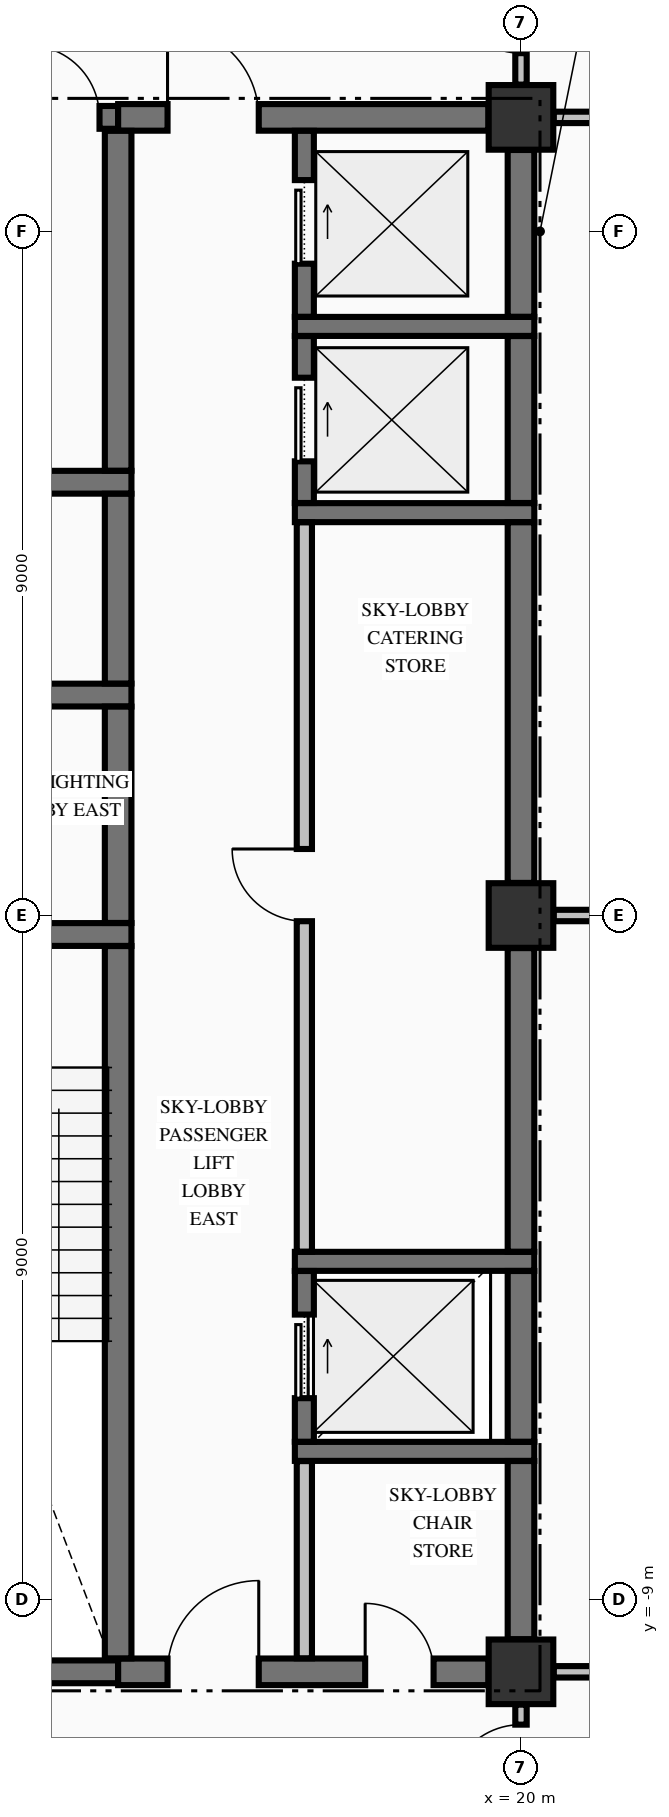
"""IFC4 building model, lengths in metres.
Left out: names, types, materials, properties, quantities, classifications, styles, units other than length and angle.
Written with IfcOpenShell. Run it as: python <this file> out.ifc"""

import sys

from ifc_helpers import new_model, si_unit, direction, frame, frame_2d, origin, origin_2d, place, context, subcontext, project, spatial, rectangle, extrude, element, fill, save


model = new_model("IFC4")
c1 = context("Model", 3, precision=1e-05, world=origin(), true_north=direction((0.0, 1.0)))
c2 = subcontext(c1, "Body", "Model", "MODEL_VIEW")
j1 = project(units=[si_unit("LENGTHUNIT", "METRE"), si_unit("PLANEANGLEUNIT", "RADIAN")], contexts=[c1])
p1 = place(None, origin())
s1 = spatial("IfcSite", under=j1, at=p1, CompositionType="ELEMENT")
p2 = place(p1, origin())
s2 = spatial("IfcBuilding", under=s1, at=p2, CompositionType="ELEMENT")
p3 = place(p2, frame((0.0, 0.0, 158.24)))
s3 = spatial("IfcBuildingStorey", under=s2, at=p3, CompositionType="ELEMENT", Elevation=158.24)
for number, where, z_axis, x_axis in (
    (1, (20.0, -9.95, -0.425), (0.0, 0.0, 1.0), (1.0, 0.0, 0.0)),
    (2, (20.0, 10.5, -0.425), (0.0, 0.0, 1.0), (1.0, 0.0, 0.0)),
    (3, (20.0, 0.0, -0.425), (0.0, 0.0, 1.0), (1.0, 0.0, 0.0)),
):
    element("IfcColumn", number, at=place(p3, frame(where, z_axis=z_axis, x_axis=x_axis)), inside=s3, PredefinedType="COLUMN", context=c2, shape_type="SweptSolid", body=[
        extrude(rectangle(XDim=0.85, YDim=0.85, at=origin_2d()), origin(), (0.0, 0.0, 1.0), 4.595),
    ])
p4 = place(p3, frame((11.429, -9.95, 0.0), z_axis=(0.0, 0.0, 1.0), x_axis=(1.0, 0.0, 0.0)))
e4 = element("IfcWall", 4, at=p4, inside=s3, PredefinedType="SHEAR", context=c2, shape_type="SweptSolid", body=[
    extrude(rectangle(XDim=3.271, YDim=0.3, at=frame_2d((1.635, 0.0))), origin(), (0.0, 0.0, 1.0), 4.17),
])
p5 = place(p3, frame((14.7, -9.95, 0.0), z_axis=(0.0, 0.0, 1.0), x_axis=(1.0, 0.0, 0.0)))
e5 = element("IfcWall", 5, at=p5, inside=s3, PredefinedType="SHEAR", context=c2, shape_type="SweptSolid", body=[
    extrude(rectangle(XDim=4.871, YDim=0.35, at=frame_2d((2.436, 0.0))), origin(), (0.0, 0.0, 1.0), 4.17),
])
p6 = place(p5, frame((0.65, 0.0, 0.0)))
e6 = element("IfcOpeningElement", 6, at=p6, cuts=e5, PredefinedType="OPENING", context=c2, shape_type="SweptSolid", body=[
    extrude(rectangle(XDim=1.2, YDim=2.15, at=frame_2d((0.6, 1.075))), frame((0.0, 0.185, 0.0), z_axis=(0.0, -1.0, 0.0), x_axis=(1.0, 0.0, 0.0)), (0.0, 0.0, 1.0), 0.37),
])
p7 = place(p5, frame((3.25, 0.0, 0.0)))
e7 = element("IfcOpeningElement", 7, at=p7, cuts=e5, PredefinedType="OPENING", context=c2, shape_type="SweptSolid", body=[
    extrude(rectangle(XDim=0.9, YDim=2.15, at=frame_2d((0.45, 1.075))), frame((0.0, 0.185, 0.0), z_axis=(0.0, -1.0, 0.0), x_axis=(1.0, 0.0, 0.0)), (0.0, 0.0, 1.0), 0.37),
])
for number, where, z_axis, x_axis in (
    (8, (17.025, -7.05, 0.0), (0.0, 0.0, 1.0), (1.0, 0.0, 0.0)),
    (9, (17.025, -4.55, 0.0), (0.0, 0.0, 1.0), (1.0, 0.0, 0.0)),
):
    element("IfcWall", number, at=place(p3, frame(where, z_axis=z_axis, x_axis=x_axis)), inside=s3, PredefinedType="SOLIDWALL", context=c2, shape_type="SweptSolid", body=[
        extrude(rectangle(XDim=3.15, YDim=0.25, at=frame_2d((1.575, 0.0))), origin(), (0.0, 0.0, 1.0), 4.17),
    ])
p8 = place(p3, frame((11.429, -0.25, 0.0), z_axis=(0.0, 0.0, 1.0), x_axis=(1.0, 0.0, 0.0)))
e10 = element("IfcWall", 10, at=p8, inside=s3, PredefinedType="SHEAR", context=c2, shape_type="SweptSolid", body=[
    extrude(rectangle(XDim=3.446, YDim=0.3, at=frame_2d((1.723, 0.0))), origin(), (0.0, 0.0, 1.0), 4.17),
])
p9 = place(p8, frame((1.171, 0.0, 0.0)))
e11 = element("IfcOpeningElement", 11, at=p9, cuts=e10, PredefinedType="OPENING", context=c2, shape_type="SweptSolid", body=[
    extrude(rectangle(XDim=1.1, YDim=2.15, at=frame_2d((0.55, 1.075))), frame((0.0, 0.16, 0.0), z_axis=(0.0, -1.0, 0.0), x_axis=(1.0, 0.0, 0.0)), (0.0, 0.0, 1.0), 0.32),
])
p10 = place(p3, frame((10.85, 2.9, 0.0), z_axis=(0.0, 0.0, 1.0), x_axis=(1.0, 0.0, 0.0)))
e12 = element("IfcWall", 12, at=p10, inside=s3, PredefinedType="SHEAR", context=c2, shape_type="SweptSolid", body=[
    extrude(rectangle(XDim=4.025, YDim=0.3, at=frame_2d((2.012, 0.0))), origin(), (0.0, 0.0, 1.0), 4.17),
])
p11 = place(p10, frame((0.85, 0.0, 0.0)))
e13 = element("IfcOpeningElement", 13, at=p11, cuts=e12, PredefinedType="OPENING", context=c2, shape_type="SweptSolid", body=[
    extrude(rectangle(XDim=1.1, YDim=2.2, at=frame_2d((0.55, 1.1))), frame((0.0, 0.16, 0.0), z_axis=(0.0, -1.0, 0.0), x_axis=(1.0, 0.0, 0.0)), (0.0, 0.0, 1.0), 0.32),
])
p12 = place(p3, frame((17.025, 5.3, 0.0), z_axis=(0.0, 0.0, 1.0), x_axis=(1.0, 0.0, 0.0)))
e14 = element("IfcWall", 14, at=p12, inside=s3, PredefinedType="SOLIDWALL", context=c2, shape_type="SweptSolid", body=[
    extrude(rectangle(XDim=3.15, YDim=0.25, at=frame_2d((1.575, 0.0))), origin(), (0.0, 0.0, 1.0), 4.17),
])
p13 = place(p3, frame((10.85, 5.7, 0.0), z_axis=(0.0, 0.0, 1.0), x_axis=(1.0, 0.0, 0.0)))
e15 = element("IfcWall", 15, at=p13, inside=s3, PredefinedType="SHEAR", context=c2, shape_type="SweptSolid", body=[
    extrude(rectangle(XDim=4.025, YDim=0.3, at=frame_2d((2.012, 0.0))), origin(), (0.0, 0.0, 1.0), 4.17),
])
p14 = place(p3, frame((17.025, 7.75, 0.0), z_axis=(0.0, 0.0, 1.0), x_axis=(1.0, 0.0, 0.0)))
e16 = element("IfcWall", 16, at=p14, inside=s3, PredefinedType="SOLIDWALL", context=c2, shape_type="SweptSolid", body=[
    extrude(rectangle(XDim=3.15, YDim=0.25, at=frame_2d((1.575, 0.0))), origin(), (0.0, 0.0, 1.0), 4.17),
])
p15 = place(p3, frame((11.429, 10.5, 0.0), z_axis=(0.0, 0.0, 1.0), x_axis=(1.0, 0.0, 0.0)))
e17 = element("IfcWall", 17, at=p15, inside=s3, PredefinedType="SHEAR", context=c2, shape_type="SweptSolid", body=[
    extrude(rectangle(XDim=3.271, YDim=0.3, at=frame_2d((1.635, 0.0))), origin(), (0.0, 0.0, 1.0), 4.17),
])
p16 = place(p15, frame((2.076, 0.0, 0.0)))
e18 = element("IfcOpeningElement", 18, at=p16, cuts=e17, PredefinedType="OPENING", context=c2, shape_type="SweptSolid", body=[
    extrude(rectangle(XDim=0.95, YDim=2.15, at=frame_2d((0.475, 1.075))), frame((0.0, 0.16, 0.0), z_axis=(0.0, -1.0, 0.0), x_axis=(1.0, 0.0, 0.0)), (0.0, 0.0, 1.0), 0.32),
])
p17 = place(p3, frame((14.7, 10.5, 0.0), z_axis=(0.0, 0.0, 1.0), x_axis=(1.0, 0.0, 0.0)))
e19 = element("IfcWall", 19, at=p17, inside=s3, PredefinedType="SHEAR", context=c2, shape_type="SweptSolid", body=[
    extrude(rectangle(XDim=4.871, YDim=0.35, at=frame_2d((2.436, 0.0))), origin(), (0.0, 0.0, 1.0), 4.17),
])
p18 = place(p17, frame((0.65, 0.0, 0.0)))
e20 = element("IfcOpeningElement", 20, at=p18, cuts=e19, PredefinedType="OPENING", context=c2, shape_type="SweptSolid", body=[
    extrude(rectangle(XDim=1.2, YDim=2.15, at=frame_2d((0.6, 1.075))), frame((0.0, 0.185, 0.0), z_axis=(0.0, -1.0, 0.0), x_axis=(1.0, 0.0, 0.0)), (0.0, 0.0, 1.0), 0.37),
])
p19 = place(p3, frame((20.431, -9.95, 0.0), z_axis=(0.0, 0.0, 1.0), x_axis=(1.0, 0.0, 0.0)))
e21 = element("IfcWall", 21, at=p19, inside=s3, PredefinedType="PARTITIONING", context=c2, shape_type="SweptSolid", body=[
    extrude(rectangle(XDim=6.404, YDim=0.15, at=frame_2d((3.202, 0.0))), origin(), (0.0, 0.0, 1.0), 4.17),
])
p20 = place(p19, frame((2.594, 0.0, 0.0)))
e22 = element("IfcOpeningElement", 22, at=p20, cuts=e21, PredefinedType="OPENING", context=c2, shape_type="SweptSolid", body=[
    extrude(rectangle(XDim=0.95, YDim=2.15, at=frame_2d((0.475, 1.075))), frame((0.0, 0.085, 0.0), z_axis=(0.0, -1.0, 0.0), x_axis=(1.0, 0.0, 0.0)), (0.0, 0.0, 1.0), 0.17),
])
p21 = place(p3, frame((20.431, 0.0, 0.0), z_axis=(0.0, 0.0, 1.0), x_axis=(1.0, 0.0, 0.0)))
e23 = element("IfcWall", 23, at=p21, inside=s3, PredefinedType="PARTITIONING", context=c2, shape_type="SweptSolid", body=[
    extrude(rectangle(XDim=6.063, YDim=0.15, at=frame_2d((3.031, 0.0))), origin(), (0.0, 0.0, 1.0), 2.362),
])
p22 = place(p3, frame((20.431, 10.5, 0.0), z_axis=(0.0, 0.0, 1.0), x_axis=(1.0, 0.0, 0.0)))
e24 = element("IfcWall", 24, at=p22, inside=s3, PredefinedType="PARTITIONING", context=c2, shape_type="SweptSolid", body=[
    extrude(rectangle(XDim=6.404, YDim=0.15, at=frame_2d((3.202, 0.0))), origin(), (0.0, 0.0, 1.0), 4.17),
])
p23 = place(p22, frame((2.594, 0.0, 0.0)))
e25 = element("IfcOpeningElement", 25, at=p23, cuts=e24, PredefinedType="OPENING", context=c2, shape_type="SweptSolid", body=[
    extrude(rectangle(XDim=0.95, YDim=2.15, at=frame_2d((0.475, 1.075))), frame((0.0, 0.085, 0.0), z_axis=(0.0, -1.0, 0.0), x_axis=(1.0, 0.0, 0.0)), (0.0, 0.0, 1.0), 0.17),
])
p24 = place(p3, frame((14.7, -9.773, 0.0), z_axis=(0.0, 0.0, 1.0), x_axis=(0.0, 1.0, 0.0)))
e26 = element("IfcWall", 26, at=p24, inside=s3, PredefinedType="SHEAR", context=c2, shape_type="SweptSolid", body=[
    extrude(rectangle(XDim=9.371, YDim=0.35, at=frame_2d((4.686, 0.0))), origin(), (0.0, 0.0, 1.0), 4.17),
])
p25 = place(p3, frame((14.7, -0.098, 0.0), z_axis=(0.0, 0.0, 1.0), x_axis=(0.0, 1.0, 0.0)))
e27 = element("IfcWall", 27, at=p25, inside=s3, PredefinedType="SHEAR", context=c2, shape_type="SweptSolid", body=[
    extrude(rectangle(XDim=2.846, YDim=0.35, at=frame_2d((1.423, 0.0))), origin(), (0.0, 0.0, 1.0), 4.17),
])
p26 = place(p3, frame((14.7, 3.052, 0.0), z_axis=(0.0, 0.0, 1.0), x_axis=(0.0, 1.0, 0.0)))
e28 = element("IfcWall", 28, at=p26, inside=s3, PredefinedType="SHEAR", context=c2, shape_type="SweptSolid", body=[
    extrude(rectangle(XDim=2.496, YDim=0.35, at=frame_2d((1.248, 0.0))), origin(), (0.0, 0.0, 1.0), 4.17),
])
p27 = place(p3, frame((14.7, 5.852, 0.0), z_axis=(0.0, 0.0, 1.0), x_axis=(0.0, 1.0, 0.0)))
e29 = element("IfcWall", 29, at=p27, inside=s3, PredefinedType="SHEAR", context=c2, shape_type="SweptSolid", body=[
    extrude(rectangle(XDim=4.471, YDim=0.35, at=frame_2d((2.235, 0.0))), origin(), (0.0, 0.0, 1.0), 4.17),
])
p28 = place(p3, frame((17.15, -6.923, 0.0), z_axis=(0.0, 0.0, 1.0), x_axis=(0.0, 1.0, 0.0)))
e30 = element("IfcWall", 30, at=p28, inside=s3, PredefinedType="SOLIDWALL", context=c2, shape_type="SweptSolid", body=[
    extrude(rectangle(XDim=2.246, YDim=0.25, at=frame_2d((1.123, 0.0))), origin(), (0.0, 0.0, 1.0), 4.17),
])
p29 = place(p28, frame((0.573, 0.0, 0.0)))
e31 = element("IfcOpeningElement", 31, at=p29, cuts=e30, PredefinedType="OPENING", context=c2, shape_type="SweptSolid", body=[
    extrude(rectangle(XDim=1.1, YDim=2.2, at=frame_2d((0.55, 1.1))), frame((0.0, 0.135, 0.0), z_axis=(0.0, -1.0, 0.0), x_axis=(1.0, 0.0, 0.0)), (0.0, 0.0, 1.0), 0.27),
])
p30 = place(p3, frame((17.15, 5.427, 0.0), z_axis=(0.0, 0.0, 1.0), x_axis=(0.0, 1.0, 0.0)))
e32 = element("IfcWall", 32, at=p30, inside=s3, PredefinedType="SOLIDWALL", context=c2, shape_type="SweptSolid", body=[
    extrude(rectangle(XDim=2.196, YDim=0.25, at=frame_2d((1.098, 0.0))), origin(), (0.0, 0.0, 1.0), 4.17),
])
p31 = place(p30, frame((0.548, 0.0, 0.0)))
e33 = element("IfcOpeningElement", 33, at=p31, cuts=e32, PredefinedType="OPENING", context=c2, shape_type="SweptSolid", body=[
    extrude(rectangle(XDim=1.1, YDim=2.2, at=frame_2d((0.55, 1.1))), frame((0.0, 0.135, 0.0), z_axis=(0.0, -1.0, 0.0), x_axis=(1.0, 0.0, 0.0)), (0.0, 0.0, 1.0), 0.27),
])
p32 = place(p3, frame((17.15, 7.877, 0.0), z_axis=(0.0, 0.0, 1.0), x_axis=(0.0, 1.0, 0.0)))
e34 = element("IfcWall", 34, at=p32, inside=s3, PredefinedType="SOLIDWALL", context=c2, shape_type="SweptSolid", body=[
    extrude(rectangle(XDim=2.446, YDim=0.25, at=frame_2d((1.223, 0.0))), origin(), (0.0, 0.0, 1.0), 4.17),
])
p33 = place(p32, frame((0.698, 0.0, 0.0)))
e35 = element("IfcOpeningElement", 35, at=p33, cuts=e34, PredefinedType="OPENING", context=c2, shape_type="SweptSolid", body=[
    extrude(rectangle(XDim=1.1, YDim=2.2, at=frame_2d((0.55, 1.1))), frame((0.0, 0.135, 0.0), z_axis=(0.0, -1.0, 0.0), x_axis=(1.0, 0.0, 0.0)), (0.0, 0.0, 1.0), 0.27),
])
p34 = place(p3, frame((20.0, -9.521, 0.0), z_axis=(0.0, 0.0, 1.0), x_axis=(0.0, 1.0, 0.0)))
e36 = element("IfcWall", 36, at=p34, inside=s3, PredefinedType="SHEAR", context=c2, shape_type="SweptSolid", body=[
    extrude(rectangle(XDim=2.344, YDim=0.35, at=frame_2d((1.172, 0.0))), origin(), (0.0, 0.0, 1.0), 4.17),
])
p35 = place(p3, frame((20.0, -6.923, 0.0), z_axis=(0.0, 0.0, 1.0), x_axis=(0.0, 1.0, 0.0)))
e37 = element("IfcWall", 37, at=p35, inside=s3, PredefinedType="SHEAR", context=c2, shape_type="SweptSolid", body=[
    extrude(rectangle(XDim=2.246, YDim=0.35, at=frame_2d((1.123, 0.0))), origin(), (0.0, 0.0, 1.0), 4.17),
])
p36 = place(p3, frame((20.0, -4.423, 0.0), z_axis=(0.0, 0.0, 1.0), x_axis=(0.0, 1.0, 0.0)))
e38 = element("IfcWall", 38, at=p36, inside=s3, PredefinedType="SHEAR", context=c2, shape_type="SweptSolid", body=[
    extrude(rectangle(XDim=3.994, YDim=0.35, at=frame_2d((1.997, 0.0))), origin(), (0.0, 0.0, 1.0), 4.17),
])
p37 = place(p3, frame((20.0, 0.429, 0.0), z_axis=(0.0, 0.0, 1.0), x_axis=(0.0, 1.0, 0.0)))
e39 = element("IfcWall", 39, at=p37, inside=s3, PredefinedType="SHEAR", context=c2, shape_type="SweptSolid", body=[
    extrude(rectangle(XDim=4.744, YDim=0.35, at=frame_2d((2.372, 0.0))), origin(), (0.0, 0.0, 1.0), 4.17),
])
p38 = place(p3, frame((20.0, 5.427, 0.0), z_axis=(0.0, 0.0, 1.0), x_axis=(0.0, 1.0, 0.0)))
e40 = element("IfcWall", 40, at=p38, inside=s3, PredefinedType="SHEAR", context=c2, shape_type="SweptSolid", body=[
    extrude(rectangle(XDim=2.196, YDim=0.35, at=frame_2d((1.098, 0.0))), origin(), (0.0, 0.0, 1.0), 4.17),
])
p39 = place(p3, frame((20.0, 7.877, 0.0), z_axis=(0.0, 0.0, 1.0), x_axis=(0.0, 1.0, 0.0)))
e41 = element("IfcWall", 41, at=p39, inside=s3, PredefinedType="SHEAR", context=c2, shape_type="SweptSolid", body=[
    extrude(rectangle(XDim=2.194, YDim=0.35, at=frame_2d((1.097, 0.0))), origin(), (0.0, 0.0, 1.0), 4.17),
])
p40 = place(p3, frame((17.15, -9.772, 0.0), z_axis=(0.0, 0.0, 1.0), x_axis=(0.0, 1.0, 0.0)))
e42 = element("IfcWall", 42, at=p40, inside=s3, PredefinedType="PARTITIONING", context=c2, shape_type="SweptSolid", body=[
    extrude(rectangle(XDim=2.594, YDim=0.2, at=frame_2d((1.297, 0.0))), origin(), (0.0, 0.0, 1.0), 4.17),
])
p41 = place(p3, frame((17.15, -4.422, 0.0), z_axis=(0.0, 0.0, 1.0), x_axis=(0.0, 1.0, 0.0)))
e43 = element("IfcWall", 43, at=p41, inside=s3, PredefinedType="PARTITIONING", context=c2, shape_type="SweptSolid", body=[
    extrude(rectangle(XDim=9.594, YDim=0.2, at=frame_2d((4.797, 0.0))), origin(), (0.0, 0.0, 1.0), 4.17),
])
p42 = place(p41, frame((4.347, 0.0, 0.0)))
e44 = element("IfcOpeningElement", 44, at=p42, cuts=e43, PredefinedType="OPENING", context=c2, shape_type="SweptSolid", body=[
    extrude(rectangle(XDim=0.95, YDim=2.15, at=frame_2d((0.475, 1.075))), frame((0.0, 0.11, 0.0), z_axis=(0.0, -1.0, 0.0), x_axis=(1.0, 0.0, 0.0)), (0.0, 0.0, 1.0), 0.22),
])
p43 = place(p3, frame((20.0, -12.222, 0.0), z_axis=(0.0, 0.0, 1.0), x_axis=(0.0, 1.0, 0.0)))
e45 = element("IfcWall", 45, at=p43, inside=s3, PredefinedType="PARTITIONING", context=c2, shape_type="SweptSolid", body=[
    extrude(rectangle(XDim=1.841, YDim=0.15, at=frame_2d((0.92, 0.0))), origin(), (0.0, 0.0, 1.0), 3.36),
])
p44 = place(p43, frame((0.627, 0.0, 0.0)))
e46 = element("IfcOpeningElement", 46, at=p44, cuts=e45, PredefinedType="OPENING", context=c2, shape_type="SweptSolid", body=[
    extrude(rectangle(XDim=0.95, YDim=2.15, at=frame_2d((0.475, 1.075))), frame((0.0, 0.085, 0.0), z_axis=(0.0, -1.0, 0.0), x_axis=(1.0, 0.0, 0.0)), (0.0, 0.0, 1.0), 0.17),
])
p45 = place(p3, frame((20.0, 10.931, 0.0), z_axis=(0.0, 0.0, 1.0), x_axis=(0.0, 1.0, 0.0)))
e47 = element("IfcWall", 47, at=p45, inside=s3, PredefinedType="PARTITIONING", context=c2, shape_type="SweptSolid", body=[
    extrude(rectangle(XDim=2.141, YDim=0.15, at=frame_2d((1.071, 0.0))), origin(), (0.0, 0.0, 1.0), 3.36),
])
p46 = place(p45, frame((0.414, 0.0, 0.0)))
e48 = element("IfcOpeningElement", 48, at=p46, cuts=e47, PredefinedType="OPENING", context=c2, shape_type="SweptSolid", body=[
    extrude(rectangle(XDim=0.95, YDim=2.15, at=frame_2d((0.475, 1.075))), frame((0.0, 0.085, 0.0), z_axis=(0.0, -1.0, 0.0), x_axis=(1.0, 0.0, 0.0)), (0.0, 0.0, 1.0), 0.17),
])
p47 = place(p16, origin())
e49 = element("IfcDoor", 49, at=p47, inside=s3, OperationType="SINGLE_SWING_LEFT", PredefinedType="DOOR", context=c2, shape_type="SweptSolid", body=[
    extrude(rectangle(XDim=0.95, YDim=2.15, at=frame_2d((0.475, 1.075))), frame((0.0, 0.025, 0.0), z_axis=(0.0, -1.0, 0.0), x_axis=(1.0, 0.0, 0.0)), (0.0, 0.0, 1.0), 0.05),
])
fill(e18, e49)
p48 = place(p29, origin())
e50 = element("IfcDoor", 50, at=p48, inside=s3, OperationType="SLIDING_TO_RIGHT", PredefinedType="DOOR", context=c2, shape_type="SweptSolid", body=[
    extrude(rectangle(XDim=1.1, YDim=2.2, at=frame_2d((0.55, 1.1))), frame((0.0, 0.025, 0.0), z_axis=(0.0, -1.0, 0.0), x_axis=(1.0, 0.0, 0.0)), (0.0, 0.0, 1.0), 0.05),
])
fill(e31, e50)
p49 = place(p31, origin())
e51 = element("IfcDoor", 51, at=p49, inside=s3, OperationType="SLIDING_TO_RIGHT", PredefinedType="DOOR", context=c2, shape_type="SweptSolid", body=[
    extrude(rectangle(XDim=1.1, YDim=2.2, at=frame_2d((0.55, 1.1))), frame((0.0, 0.025, 0.0), z_axis=(0.0, -1.0, 0.0), x_axis=(1.0, 0.0, 0.0)), (0.0, 0.0, 1.0), 0.05),
])
fill(e33, e51)
p50 = place(p33, origin())
e52 = element("IfcDoor", 52, at=p50, inside=s3, OperationType="SLIDING_TO_RIGHT", PredefinedType="DOOR", context=c2, shape_type="SweptSolid", body=[
    extrude(rectangle(XDim=1.1, YDim=2.2, at=frame_2d((0.55, 1.1))), frame((0.0, 0.025, 0.0), z_axis=(0.0, -1.0, 0.0), x_axis=(1.0, 0.0, 0.0)), (0.0, 0.0, 1.0), 0.05),
])
fill(e35, e52)
p51 = place(p6, origin())
e53 = element("IfcDoor", 53, at=p51, inside=s3, OperationType="SINGLE_SWING_RIGHT", PredefinedType="DOOR", context=c2, shape_type="SweptSolid", body=[
    extrude(rectangle(XDim=1.2, YDim=2.15, at=frame_2d((0.6, 1.075))), frame((0.0, 0.025, 0.0), z_axis=(0.0, -1.0, 0.0), x_axis=(1.0, 0.0, 0.0)), (0.0, 0.0, 1.0), 0.05),
])
fill(e6, e53)
p52 = place(p18, origin())
e54 = element("IfcDoor", 54, at=p52, inside=s3, OperationType="SINGLE_SWING_LEFT", PredefinedType="DOOR", context=c2, shape_type="SweptSolid", body=[
    extrude(rectangle(XDim=1.2, YDim=2.15, at=frame_2d((0.6, 1.075))), frame((0.0, 0.025, 0.0), z_axis=(0.0, -1.0, 0.0), x_axis=(1.0, 0.0, 0.0)), (0.0, 0.0, 1.0), 0.05),
])
fill(e20, e54)
p53 = place(p42, origin())
e55 = element("IfcDoor", 55, at=p53, inside=s3, OperationType="SINGLE_SWING_RIGHT", PredefinedType="DOOR", context=c2, shape_type="SweptSolid", body=[
    extrude(rectangle(XDim=0.95, YDim=2.15, at=frame_2d((0.475, 1.075))), frame((0.0, 0.025, 0.0), z_axis=(0.0, -1.0, 0.0), x_axis=(1.0, 0.0, 0.0)), (0.0, 0.0, 1.0), 0.05),
])
fill(e44, e55)
p54 = place(p7, origin())
e56 = element("IfcDoor", 56, at=p54, inside=s3, OperationType="SINGLE_SWING_LEFT", PredefinedType="DOOR", context=c2, shape_type="SweptSolid", body=[
    extrude(rectangle(XDim=0.9, YDim=2.15, at=frame_2d((0.45, 1.075))), frame((0.0, 0.025, 0.0), z_axis=(0.0, -1.0, 0.0), x_axis=(1.0, 0.0, 0.0)), (0.0, 0.0, 1.0), 0.05),
])
fill(e7, e56)
p55 = place(p46, origin())
e57 = element("IfcDoor", 57, at=p55, inside=s3, OperationType="SINGLE_SWING_RIGHT", PredefinedType="DOOR", context=c2, shape_type="SweptSolid", body=[
    extrude(rectangle(XDim=0.95, YDim=2.15, at=frame_2d((0.475, 1.075))), frame((0.0, 0.025, 0.0), z_axis=(0.0, -1.0, 0.0), x_axis=(1.0, 0.0, 0.0)), (0.0, 0.0, 1.0), 0.05),
])
fill(e48, e57)
p56 = place(p44, origin())
e58 = element("IfcDoor", 58, at=p56, inside=s3, OperationType="SINGLE_SWING_LEFT", PredefinedType="DOOR", context=c2, shape_type="SweptSolid", body=[
    extrude(rectangle(XDim=0.95, YDim=2.15, at=frame_2d((0.475, 1.075))), frame((0.0, 0.025, 0.0), z_axis=(0.0, -1.0, 0.0), x_axis=(1.0, 0.0, 0.0)), (0.0, 0.0, 1.0), 0.05),
])
fill(e46, e58)
save(model, sys.argv[1])
